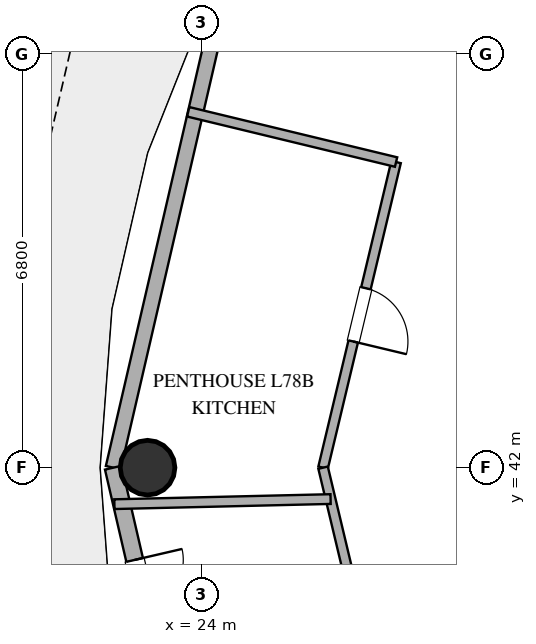
"""IFC4 building model, lengths in metres.
Left out: names, types, materials, properties, quantities, classifications, styles, units other than length and angle.
Written with IfcOpenShell. Run it as: python <this file> out.ifc"""

import sys

from ifc_helpers import new_model, si_unit, direction, frame, frame_2d, origin, origin_2d, place, context, subcontext, project, spatial, rectangle, hollow_circle, extrude, element, fill, save


model = new_model("IFC4")
c1 = context("Model", 3, precision=1e-05, world=origin(), true_north=direction((0.0, 1.0)))
c2 = subcontext(c1, "Body", "Model", "MODEL_VIEW")
j1 = project(units=[si_unit("LENGTHUNIT", "METRE"), si_unit("PLANEANGLEUNIT", "RADIAN")], contexts=[c1])
p1 = place(None, origin())
s1 = spatial("IfcSite", under=j1, at=p1, CompositionType="ELEMENT")
p2 = place(p1, origin())
s2 = spatial("IfcBuilding", under=s1, at=p2, CompositionType="ELEMENT")
p3 = place(p2, frame((0.0, 0.0, 301.8)))
s3 = spatial("IfcBuildingStorey", under=s2, at=p3, CompositionType="ELEMENT", Elevation=301.8)
p4 = place(p3, frame((23.117, 42.0, 0.0), z_axis=(0.0, 0.0, 1.0), x_axis=(1.0, 0.0, 0.0)))
e1 = element("IfcColumn", 1, at=p4, inside=s3, PredefinedType="COLUMN", context=c2, shape_type="SweptSolid", body=[
    extrude(hollow_circle(Radius=0.45, WallThickness=0.025, at=origin_2d()), origin(), (0.0, 0.0, 1.0), 3.37),
])
p5 = place(p3, frame((24.306, 49.57, 0.0), z_axis=(0.0, 0.0, 1.0), x_axis=(-0.225635078214, -0.974211892495, 0.0)))
e2 = element("IfcWall", 2, at=p5, inside=s3, PredefinedType="SOLIDWALL", context=c2, shape_type="SweptSolid", body=[
    extrude(rectangle(XDim=7.77, YDim=0.25, at=frame_2d((3.885, 0.0))), origin(), (0.0, 0.0, 1.0), 3.37),
])
p6 = place(p3, frame((22.553, 42.0, 0.0), z_axis=(0.0, 0.0, 1.0), x_axis=(0.225635078214, -0.974211892495, 0.0)))
e3 = element("IfcWall", 3, at=p6, inside=s3, PredefinedType="SOLIDWALL", context=c2, shape_type="SweptSolid", body=[
    extrude(rectangle(XDim=7.77, YDim=0.28, at=frame_2d((3.885, 0.0))), origin(), (0.0, 0.0, 1.0), 3.37),
])
p7 = place(p6, frame((1.557, 0.0, 0.0)))
e4 = element("IfcOpeningElement", 4, at=p7, cuts=e3, PredefinedType="OPENING", context=c2, shape_type="SweptSolid", body=[
    extrude(rectangle(XDim=1.6, YDim=2.25, at=frame_2d((0.8, 1.125))), frame((0.0, 0.15, 0.0), z_axis=(0.0, -1.0, 0.0), x_axis=(1.0, 0.0, 0.0)), (0.0, 0.0, 1.0), 0.3),
])
p8 = place(p3, frame((34.8, 40.379, 0.0), z_axis=(0.0, 0.0, 1.0), x_axis=(-0.99254493565, -0.121879246453, 0.0)))
e5 = element("IfcWall", 5, at=p8, inside=s3, PredefinedType="PLUMBINGWALL", context=c2, shape_type="SweptSolid", body=[
    extrude(rectangle(XDim=6.65, YDim=0.18, at=frame_2d((3.325, 0.0))), origin(), (0.0, 0.0, 1.0), 2.73),
])
p9 = place(p8, frame((2.9, 0.0, 0.0)))
e6 = element("IfcOpeningElement", 6, at=p9, cuts=e5, PredefinedType="OPENING", context=c2, shape_type="SweptSolid", body=[
    extrude(rectangle(XDim=0.85, YDim=2.1, at=frame_2d((0.425, 1.05))), frame((0.0, 0.1, 0.0), z_axis=(0.0, -1.0, 0.0), x_axis=(1.0, 0.0, 0.0)), (0.0, 0.0, 1.0), 0.2),
])
p10 = place(p3, frame((27.204, 47.026, 0.0), z_axis=(0.0, 0.0, 1.0), x_axis=(-0.232306036208, -0.972642743016, 0.0)))
e7 = element("IfcWall", 7, at=p10, inside=s3, PredefinedType="PLUMBINGWALL", context=c2, shape_type="SweptSolid", body=[
    extrude(rectangle(XDim=5.167, YDim=0.16, at=frame_2d((2.584, 0.0))), origin(), (0.0, 0.0, 1.0), 2.73),
])
p11 = place(p10, frame((2.134, 0.0, 0.0)))
e8 = element("IfcOpeningElement", 8, at=p11, cuts=e7, PredefinedType="OPENING", context=c2, shape_type="SweptSolid", body=[
    extrude(rectangle(XDim=0.9, YDim=2.1, at=frame_2d((0.45, 1.05))), frame((0.0, 0.09, 0.0), z_axis=(0.0, -1.0, 0.0), x_axis=(1.0, 0.0, 0.0)), (0.0, 0.0, 1.0), 0.18),
])
p12 = place(p3, frame((27.519, 35.655, 0.0), z_axis=(0.0, 0.0, 1.0), x_axis=(-0.232298462197, 0.972644551962, 0.0)))
e9 = element("IfcWall", 9, at=p12, inside=s3, PredefinedType="PLUMBINGWALL", context=c2, shape_type="SweptSolid", body=[
    extrude(rectangle(XDim=6.523, YDim=0.16, at=frame_2d((3.262, 0.0))), origin(), (0.0, 0.0, 1.0), 2.73),
])
p13 = place(p12, frame((3.264, 0.0, 0.0)))
e10 = element("IfcOpeningElement", 10, at=p13, cuts=e9, PredefinedType="OPENING", context=c2, shape_type="SweptSolid", body=[
    extrude(rectangle(XDim=0.9, YDim=2.1, at=frame_2d((0.45, 1.05))), frame((0.0, 0.09, 0.0), z_axis=(0.0, -1.0, 0.0), x_axis=(1.0, 0.0, 0.0)), (0.0, 0.0, 1.0), 0.18),
])
p14 = place(p3, frame((26.127, 41.484, 0.0), z_axis=(0.0, 0.0, 1.0), x_axis=(-0.999722785281, -0.023544693446, 0.0)))
e11 = element("IfcWall", 11, at=p14, inside=s3, PredefinedType="PLUMBINGWALL", context=c2, shape_type="SweptSolid", body=[
    extrude(rectangle(XDim=3.557, YDim=0.16, at=frame_2d((1.778, 0.0))), origin(), (0.0, 0.0, 1.0), 2.73),
])
p15 = place(p3, frame((23.785, 47.852, 0.0), z_axis=(0.0, 0.0, 1.0), x_axis=(0.972019388221, -0.234900636274, 0.0)))
e12 = element("IfcWall", 12, at=p15, inside=s3, PredefinedType="PLUMBINGWALL", context=c2, shape_type="SweptSolid", body=[
    extrude(rectangle(XDim=3.517, YDim=0.16, at=frame_2d((1.759, 0.0))), origin(), (0.0, 0.0, 1.0), 2.73),
])
p16 = place(p7, origin())
e13 = element("IfcDoor", 13, at=p16, inside=s3, OperationType="DOUBLE_DOOR_SINGLE_SWING", PredefinedType="DOOR", context=c2, shape_type="SweptSolid", body=[
    extrude(rectangle(XDim=1.6, YDim=2.25, at=frame_2d((0.8, 1.125))), frame((0.0, 0.025, 0.0), z_axis=(0.0, -1.0, 0.0), x_axis=(1.0, 0.0, 0.0)), (0.0, 0.0, 1.0), 0.05),
])
fill(e4, e13)
p17 = place(p11, origin())
e14 = element("IfcDoor", 14, at=p17, inside=s3, OperationType="SINGLE_SWING_RIGHT", PredefinedType="DOOR", context=c2, shape_type="SweptSolid", body=[
    extrude(rectangle(XDim=0.9, YDim=2.1, at=frame_2d((0.45, 1.05))), frame((0.0, 0.025, 0.0), z_axis=(0.0, -1.0, 0.0), x_axis=(1.0, 0.0, 0.0)), (0.0, 0.0, 1.0), 0.05),
])
fill(e8, e14)
save(model, sys.argv[1])
